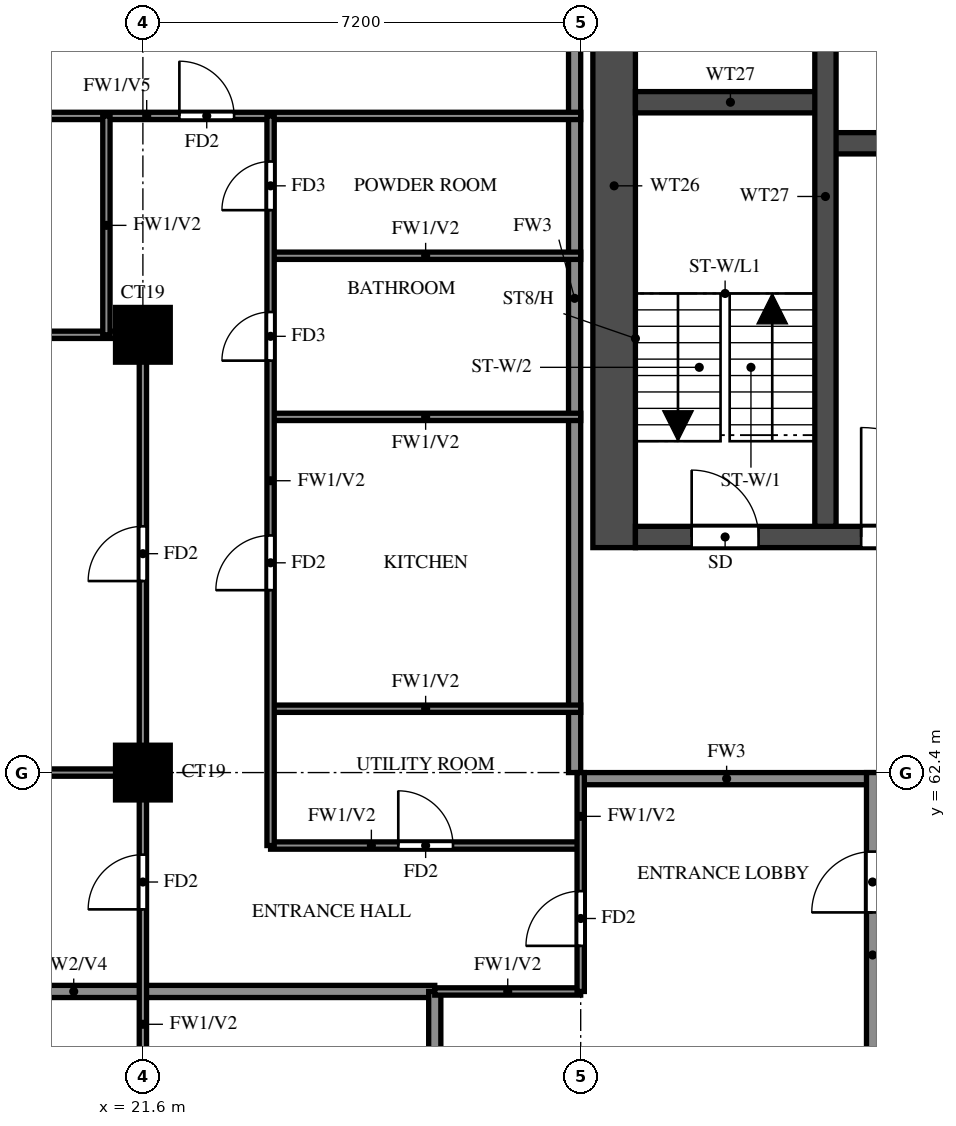
"""IFC4 building model, lengths in metres.
Left out: names, types, materials, properties, quantities, classifications, styles, units other than length and angle.
Written with IfcOpenShell. Run it as: python <this file> out.ifc"""

import sys

from ifc_helpers import new_model, si_unit, direction, frame, frame_2d, origin, origin_2d, place, context, subcontext, project, spatial, rectangle, extrude, source, transform, mapped, element, fill, save


model = new_model("IFC4")
c1 = context("Model", 3, precision=1e-05, world=origin(), true_north=direction((0.0, 1.0)))
c2 = subcontext(c1, "Body", "Model", "MODEL_VIEW")
j1 = project(units=[si_unit("LENGTHUNIT", "METRE"), si_unit("PLANEANGLEUNIT", "RADIAN")], contexts=[c1])
p1 = place(None, origin())
s1 = spatial("IfcSite", under=j1, at=p1, CompositionType="ELEMENT")
p2 = place(p1, origin())
s2 = spatial("IfcBuilding", under=s1, at=p2, CompositionType="ELEMENT")
p3 = place(p2, frame((0.0, 0.0, 181.5)))
s3 = spatial("IfcBuildingStorey", under=s2, at=p3, CompositionType="ELEMENT", Elevation=181.5)
m1 = source(origin(), c2, "Body", "SweptSolid", [
    extrude(rectangle(XDim=0.9, YDim=0.9, at=origin_2d()), origin(), (0.0, 0.0, 1.0), 3.2),
])
for number, where, z_axis, x_axis in (
    (1, (21.6, 62.4, 0.0), (0.0, 0.0, 1.0), (1.0, 0.0, 0.0)),
    (2, (21.6, 69.6, 0.0), (0.0, 0.0, 1.0), (1.0, 0.0, 0.0)),
):
    element("IfcColumn", number, at=place(p3, frame(where, z_axis=z_axis, x_axis=x_axis)), inside=s3, PredefinedType="COLUMN", context=c2, shape_type="MappedRepresentation", body=[
        mapped(m1, transform((0.0, 0.0, 0.0))),
    ])
p4 = place(p3, frame((29.35, 66.1, 0.0), z_axis=(0.0, 0.0, 1.0), x_axis=(0.0, 1.0, 0.0)))
e3 = element("IfcWall", 3, at=p4, inside=s3, PredefinedType="SHEAR", context=c2, shape_type="SweptSolid", body=[
    extrude(rectangle(XDim=11.9, YDim=0.7, at=frame_2d((5.95, 0.0))), origin(), (0.0, 0.0, 1.0), 3.2),
])
p5 = place(p3, frame((29.7, 66.275, 0.0), z_axis=(0.0, 0.0, 1.0), x_axis=(1.0, 0.0, 0.0)))
e4 = element("IfcWall", 4, at=p5, inside=s3, PredefinedType="SHEAR", context=c2, shape_type="SweptSolid", body=[
    extrude(rectangle(XDim=41.4, YDim=0.35, at=frame_2d((20.7, 0.0))), origin(), (0.0, 0.0, 1.0), 3.2),
])
p6 = place(p5, frame((0.925, 0.0, 0.0)))
e5 = element("IfcOpeningElement", 5, at=p6, cuts=e4, PredefinedType="OPENING", context=c2, shape_type="SweptSolid", body=[
    extrude(rectangle(XDim=1.1, YDim=2.1, at=frame_2d((0.55, 1.05))), frame((0.0, 0.185, 0.0), z_axis=(0.0, -1.0, 0.0), x_axis=(1.0, 0.0, 0.0)), (0.0, 0.0, 1.0), 0.37),
])
p7 = place(p5, frame((3.712, 0.0, 0.0)))
e6 = element("IfcOpeningElement", 6, at=p7, cuts=e4, PredefinedType="OPENING", context=c2, shape_type="SweptSolid", body=[
    extrude(rectangle(XDim=1.8, YDim=2.1, at=frame_2d((0.9, 1.05))), frame((0.0, 0.185, 0.0), z_axis=(0.0, -1.0, 0.0), x_axis=(1.0, 0.0, 0.0)), (0.0, 0.0, 1.0), 0.37),
])
p8 = place(p3, frame((32.825, 72.75, 0.0), z_axis=(0.0, 0.0, 1.0), x_axis=(1.0, 0.0, 0.0)))
e7 = element("IfcWall", 7, at=p8, inside=s3, PredefinedType="SHEAR", context=c2, shape_type="SweptSolid", body=[
    extrude(rectangle(XDim=35.15, YDim=0.35, at=frame_2d((17.575, 0.0))), origin(), (0.0, 0.0, 1.0), 3.2),
])
p9 = place(p8, frame((19.8, 0.0, 0.0)))
e8 = element("IfcOpeningElement", 8, at=p9, cuts=e7, PredefinedType="OPENING", context=c2, shape_type="SweptSolid", body=[
    extrude(rectangle(XDim=1.1, YDim=2.1, at=frame_2d((0.55, 1.05))), frame((0.0, 0.185, 0.0), z_axis=(0.0, -1.0, 0.0), x_axis=(1.0, 0.0, 0.0)), (0.0, 0.0, 1.0), 0.37),
])
p10 = place(p8, frame((27.7, 0.0, 0.0)))
e9 = element("IfcOpeningElement", 9, at=p10, cuts=e7, PredefinedType="OPENING", context=c2, shape_type="SweptSolid", body=[
    extrude(rectangle(XDim=1.1, YDim=2.1, at=frame_2d((0.55, 1.05))), frame((0.0, 0.185, 0.0), z_axis=(0.0, -1.0, 0.0), x_axis=(1.0, 0.0, 0.0)), (0.0, 0.0, 1.0), 0.37),
])
p11 = place(p8, frame((30.3, 0.0, 0.0)))
e10 = element("IfcOpeningElement", 10, at=p11, cuts=e7, PredefinedType="OPENING", context=c2, shape_type="SweptSolid", body=[
    extrude(rectangle(XDim=1.1, YDim=2.1, at=frame_2d((0.55, 1.05))), frame((0.0, 0.185, 0.0), z_axis=(0.0, -1.0, 0.0), x_axis=(1.0, 0.0, 0.0)), (0.0, 0.0, 1.0), 0.37),
])
p12 = place(p8, frame((3.8, 0.0, 0.0)))
e11 = element("IfcOpeningElement", 11, at=p12, cuts=e7, PredefinedType="OPENING", context=c2, shape_type="SweptSolid", body=[
    extrude(rectangle(XDim=1.1, YDim=2.1, at=frame_2d((0.55, 1.05))), frame((0.0, 0.185, 0.0), z_axis=(0.0, -1.0, 0.0), x_axis=(1.0, 0.0, 0.0)), (0.0, 0.0, 1.0), 0.37),
])
p13 = place(p8, frame((6.55, 0.0, 0.0)))
e12 = element("IfcOpeningElement", 12, at=p13, cuts=e7, PredefinedType="OPENING", context=c2, shape_type="SweptSolid", body=[
    extrude(rectangle(XDim=1.1, YDim=2.1, at=frame_2d((0.55, 1.05))), frame((0.0, 0.185, 0.0), z_axis=(0.0, -1.0, 0.0), x_axis=(1.0, 0.0, 0.0)), (0.0, 0.0, 1.0), 0.37),
])
p14 = place(p8, frame((9.3, 0.0, 0.0)))
e13 = element("IfcOpeningElement", 13, at=p14, cuts=e7, PredefinedType="OPENING", context=c2, shape_type="SweptSolid", body=[
    extrude(rectangle(XDim=1.1, YDim=2.1, at=frame_2d((0.55, 1.05))), frame((0.0, 0.185, 0.0), z_axis=(0.0, -1.0, 0.0), x_axis=(1.0, 0.0, 0.0)), (0.0, 0.0, 1.0), 0.37),
])
p15 = place(p8, frame((12.05, 0.0, 0.0)))
e14 = element("IfcOpeningElement", 14, at=p15, cuts=e7, PredefinedType="OPENING", context=c2, shape_type="SweptSolid", body=[
    extrude(rectangle(XDim=1.1, YDim=2.1, at=frame_2d((0.55, 1.05))), frame((0.0, 0.185, 0.0), z_axis=(0.0, -1.0, 0.0), x_axis=(1.0, 0.0, 0.0)), (0.0, 0.0, 1.0), 0.37),
])
p16 = place(p8, frame((14.8, 0.0, 0.0)))
e15 = element("IfcOpeningElement", 15, at=p16, cuts=e7, PredefinedType="OPENING", context=c2, shape_type="SweptSolid", body=[
    extrude(rectangle(XDim=1.1, YDim=2.1, at=frame_2d((0.55, 1.05))), frame((0.0, 0.185, 0.0), z_axis=(0.0, -1.0, 0.0), x_axis=(1.0, 0.0, 0.0)), (0.0, 0.0, 1.0), 0.37),
])
p17 = place(p8, frame((17.55, 0.0, 0.0)))
e16 = element("IfcOpeningElement", 16, at=p17, cuts=e7, PredefinedType="OPENING", context=c2, shape_type="SweptSolid", body=[
    extrude(rectangle(XDim=1.1, YDim=2.1, at=frame_2d((0.55, 1.05))), frame((0.0, 0.185, 0.0), z_axis=(0.0, -1.0, 0.0), x_axis=(1.0, 0.0, 0.0)), (0.0, 0.0, 1.0), 0.37),
])
p18 = place(p8, frame((0.938, 0.0, 0.0)))
e17 = element("IfcOpeningElement", 17, at=p18, cuts=e7, PredefinedType="OPENING", context=c2, shape_type="SweptSolid", body=[
    extrude(rectangle(XDim=1.1, YDim=2.1, at=frame_2d((0.55, 1.05))), frame((0.0, 0.185, 0.0), z_axis=(0.0, -1.0, 0.0), x_axis=(1.0, 0.0, 0.0)), (0.0, 0.0, 1.0), 0.37),
])
p19 = place(p3, frame((29.7, 73.425, 0.0), z_axis=(0.0, 0.0, 1.0), x_axis=(1.0, 0.0, 0.0)))
e18 = element("IfcWall", 18, at=p19, inside=s3, PredefinedType="SHEAR", context=c2, shape_type="SweptSolid", body=[
    extrude(rectangle(XDim=3.125, YDim=0.35, at=frame_2d((1.562, 0.0))), origin(), (0.0, 0.0, 1.0), 3.2),
])
p20 = place(p3, frame((32.825, 66.45, 0.0), z_axis=(0.0, 0.0, 1.0), x_axis=(0.0, 1.0, 0.0)))
e19 = element("IfcWall", 19, at=p20, inside=s3, PredefinedType="SHEAR", context=c2, shape_type="SweptSolid", body=[
    extrude(rectangle(XDim=10.85, YDim=0.35, at=frame_2d((5.425, 0.0))), origin(), (0.0, 0.0, 1.0), 3.2),
])
p21 = place(p3, frame((28.8, 62.3, 0.0), z_axis=(0.0, 0.0, 1.0), x_axis=(1.0, 0.0, 0.0)))
e20 = element("IfcWall", 20, at=p21, inside=s3, PredefinedType="SOLIDWALL", context=c2, shape_type="SweptSolid", body=[
    extrude(rectangle(XDim=4.8, YDim=0.2, at=frame_2d((2.4, 0.0))), origin(), (0.0, 0.0, 1.0), 3.2),
])
p22 = place(p3, frame((28.7, 62.4, 0.0), z_axis=(0.0, 0.0, 1.0), x_axis=(0.0, 1.0, 0.0)))
e21 = element("IfcWall", 21, at=p22, inside=s3, PredefinedType="SOLIDWALL", context=c2, shape_type="SweptSolid", body=[
    extrude(rectangle(XDim=15.6, YDim=0.2, at=frame_2d((7.8, 0.0))), origin(), (0.0, 0.0, 1.0), 3.2),
])
p23 = place(p3, frame((33.6, 56.4, 0.0), z_axis=(0.0, 0.0, 1.0), x_axis=(0.0, 1.0, 0.0)))
e22 = element("IfcWall", 22, at=p23, inside=s3, PredefinedType="SOLIDWALL", context=c2, shape_type="SweptSolid", body=[
    extrude(rectangle(XDim=6.0, YDim=0.2, at=frame_2d((3.0, 0.0))), origin(), (0.0, 0.0, 1.0), 3.2),
])
p24 = place(p23, frame((3.7, 0.0, 0.0)))
e23 = element("IfcOpeningElement", 23, at=p24, cuts=e22, PredefinedType="OPENING", context=c2, shape_type="SweptSolid", body=[
    extrude(rectangle(XDim=1.0, YDim=2.1, at=frame_2d((0.5, 1.05))), frame((0.0, 0.11, 0.0), z_axis=(0.0, -1.0, 0.0), x_axis=(1.0, 0.0, 0.0)), (0.0, 0.0, 1.0), 0.22),
])
p25 = place(p3, frame((14.525, 58.8, 0.0), z_axis=(0.0, 0.0, 1.0), x_axis=(1.0, 0.0, 0.0)))
e24 = element("IfcWall", 24, at=p25, inside=s3, PredefinedType="SOLIDWALL", context=c2, shape_type="SweptSolid", body=[
    extrude(rectangle(XDim=11.875, YDim=0.2, at=frame_2d((5.938, 0.0))), origin(), (0.0, 0.0, 1.0), 2.3),
])
p26 = place(p3, frame((26.4, 56.4, 0.0), z_axis=(0.0, 0.0, 1.0), x_axis=(0.0, 1.0, 0.0)))
e25 = element("IfcWall", 25, at=p26, inside=s3, PredefinedType="SOLIDWALL", context=c2, shape_type="SweptSolid", body=[
    extrude(rectangle(XDim=2.4, YDim=0.2, at=frame_2d((1.2, 0.0))), origin(), (0.0, 0.0, 1.0), 3.2),
])
p27 = place(p3, frame((26.4, 58.8, 0.0), z_axis=(0.0, 0.0, 1.0), x_axis=(1.0, 0.0, 0.0)))
e26 = element("IfcWall", 26, at=p27, inside=s3, PredefinedType="PARTITIONING", context=c2, shape_type="SweptSolid", body=[
    extrude(rectangle(XDim=2.4, YDim=0.12, at=frame_2d((1.2, 0.0))), origin(), (0.0, 0.0, 1.0), 3.2),
])
p28 = place(p3, frame((23.7, 61.2, 0.0), z_axis=(0.0, 0.0, 1.0), x_axis=(1.0, 0.0, 0.0)))
e27 = element("IfcWall", 27, at=p28, inside=s3, PredefinedType="PARTITIONING", context=c2, shape_type="SweptSolid", body=[
    extrude(rectangle(XDim=5.1, YDim=0.12, at=frame_2d((2.55, 0.0))), origin(), (0.0, 0.0, 1.0), 3.2),
])
p29 = place(p28, frame((2.1, 0.0, 0.0)))
e28 = element("IfcOpeningElement", 28, at=p29, cuts=e27, PredefinedType="OPENING", context=c2, shape_type="SweptSolid", body=[
    extrude(rectangle(XDim=0.9, YDim=2.1, at=frame_2d((0.45, 1.05))), frame((0.0, 0.07, 0.0), z_axis=(0.0, -1.0, 0.0), x_axis=(1.0, 0.0, 0.0)), (0.0, 0.0, 1.0), 0.14),
])
p30 = place(p3, frame((14.525, 62.4, 0.0), z_axis=(0.0, 0.0, 1.0), x_axis=(1.0, 0.0, 0.0)))
e29 = element("IfcWall", 29, at=p30, inside=s3, PredefinedType="PARTITIONING", context=c2, shape_type="SweptSolid", body=[
    extrude(rectangle(XDim=7.075, YDim=0.12, at=frame_2d((3.538, 0.0))), origin(), (0.0, 0.0, 1.0), 3.2),
])
for number, where, z_axis, x_axis in (
    (30, (23.7, 63.45, 0.0), (0.0, 0.0, 1.0), (1.0, 0.0, 0.0)),
    (31, (23.7, 68.25, 0.0), (0.0, 0.0, 1.0), (1.0, 0.0, 0.0)),
):
    element("IfcWall", number, at=place(p3, frame(where, z_axis=z_axis, x_axis=x_axis)), inside=s3, PredefinedType="PARTITIONING", context=c2, shape_type="SweptSolid", body=[
        extrude(rectangle(XDim=5.1, YDim=0.12, at=frame_2d((2.55, 0.0))), origin(), (0.0, 0.0, 1.0), 3.2),
    ])
p31 = place(p3, frame((14.525, 69.6, 0.0), z_axis=(0.0, 0.0, 1.0), x_axis=(1.0, 0.0, 0.0)))
e32 = element("IfcWall", 32, at=p31, inside=s3, PredefinedType="PARTITIONING", context=c2, shape_type="SweptSolid", body=[
    extrude(rectangle(XDim=7.075, YDim=0.12, at=frame_2d((3.538, 0.0))), origin(), (0.0, 0.0, 1.0), 3.2),
])
p32 = place(p31, frame((2.837, 0.0, 0.0)))
e33 = element("IfcOpeningElement", 33, at=p32, cuts=e32, PredefinedType="OPENING", context=c2, shape_type="SweptSolid", body=[
    extrude(rectangle(XDim=0.8, YDim=2.1, at=frame_2d((0.4, 1.05))), frame((0.0, 0.07, 0.0), z_axis=(0.0, -1.0, 0.0), x_axis=(1.0, 0.0, 0.0)), (0.0, 0.0, 1.0), 0.14),
])
p33 = place(p3, frame((23.7, 70.9, 0.0), z_axis=(0.0, 0.0, 1.0), x_axis=(1.0, 0.0, 0.0)))
e34 = element("IfcWall", 34, at=p33, inside=s3, PredefinedType="PARTITIONING", context=c2, shape_type="SweptSolid", body=[
    extrude(rectangle(XDim=5.1, YDim=0.12, at=frame_2d((2.55, 0.0))), origin(), (0.0, 0.0, 1.0), 3.2),
])
p34 = place(p3, frame((14.525, 73.2, 0.0), z_axis=(0.0, 0.0, 1.0), x_axis=(1.0, 0.0, 0.0)))
e35 = element("IfcWall", 35, at=p34, inside=s3, PredefinedType="PARTITIONING", context=c2, shape_type="SweptSolid", body=[
    extrude(rectangle(XDim=14.275, YDim=0.12, at=frame_2d((7.138, 0.0))), origin(), (0.0, 0.0, 1.0), 2.3),
])
p35 = place(p34, frame((7.675, 0.0, 0.0)))
e36 = element("IfcOpeningElement", 36, at=p35, cuts=e35, PredefinedType="OPENING", context=c2, shape_type="SweptSolid", body=[
    extrude(rectangle(XDim=0.9, YDim=2.1, at=frame_2d((0.45, 1.05))), frame((0.0, 0.07, 0.0), z_axis=(0.0, -1.0, 0.0), x_axis=(1.0, 0.0, 0.0)), (0.0, 0.0, 1.0), 0.14),
])
p36 = place(p3, frame((21.0, 69.6, 0.0), z_axis=(0.0, 0.0, 1.0), x_axis=(0.0, 1.0, 0.0)))
e37 = element("IfcWall", 37, at=p36, inside=s3, PredefinedType="PARTITIONING", context=c2, shape_type="SweptSolid", body=[
    extrude(rectangle(XDim=3.6, YDim=0.12, at=frame_2d((1.8, 0.0))), origin(), (0.0, 0.0, 1.0), 3.2),
])
p37 = place(p3, frame((21.6, 48.0, 0.0), z_axis=(0.0, 0.0, 1.0), x_axis=(0.0, 1.0, 0.0)))
e38 = element("IfcWall", 38, at=p37, inside=s3, PredefinedType="PARTITIONING", context=c2, shape_type="SweptSolid", body=[
    extrude(rectangle(XDim=21.6, YDim=0.12, at=frame_2d((10.8, 0.0))), origin(), (0.0, 0.0, 1.0), 3.2),
])
p38 = place(p37, frame((1.35, 0.0, 0.0)))
e39 = element("IfcOpeningElement", 39, at=p38, cuts=e38, PredefinedType="OPENING", context=c2, shape_type="SweptSolid", body=[
    extrude(rectangle(XDim=0.9, YDim=2.1, at=frame_2d((0.45, 1.05))), frame((0.0, 0.07, 0.0), z_axis=(0.0, -1.0, 0.0), x_axis=(1.0, 0.0, 0.0)), (0.0, 0.0, 1.0), 0.14),
])
p39 = place(p37, frame((7.95, 0.0, 0.0)))
e40 = element("IfcOpeningElement", 40, at=p39, cuts=e38, PredefinedType="OPENING", context=c2, shape_type="SweptSolid", body=[
    extrude(rectangle(XDim=1.5, YDim=2.1, at=frame_2d((0.75, 1.05))), frame((0.0, 0.07, 0.0), z_axis=(0.0, -1.0, 0.0), x_axis=(1.0, 0.0, 0.0)), (0.0, 0.0, 1.0), 0.14),
])
p40 = place(p37, frame((12.15, 0.0, 0.0)))
e41 = element("IfcOpeningElement", 41, at=p40, cuts=e38, PredefinedType="OPENING", context=c2, shape_type="SweptSolid", body=[
    extrude(rectangle(XDim=0.9, YDim=2.1, at=frame_2d((0.45, 1.05))), frame((0.0, 0.07, 0.0), z_axis=(0.0, -1.0, 0.0), x_axis=(1.0, 0.0, 0.0)), (0.0, 0.0, 1.0), 0.14),
])
p41 = place(p37, frame((17.55, 0.0, 0.0)))
e42 = element("IfcOpeningElement", 42, at=p41, cuts=e38, PredefinedType="OPENING", context=c2, shape_type="SweptSolid", body=[
    extrude(rectangle(XDim=0.9, YDim=2.1, at=frame_2d((0.45, 1.05))), frame((0.0, 0.07, 0.0), z_axis=(0.0, -1.0, 0.0), x_axis=(1.0, 0.0, 0.0)), (0.0, 0.0, 1.0), 0.14),
])
p42 = place(p3, frame((23.7, 61.2, 0.0), z_axis=(0.0, 0.0, 1.0), x_axis=(0.0, 1.0, 0.0)))
e43 = element("IfcWall", 43, at=p42, inside=s3, PredefinedType="PARTITIONING", context=c2, shape_type="SweptSolid", body=[
    extrude(rectangle(XDim=12.0, YDim=0.12, at=frame_2d((6.0, 0.0))), origin(), (0.0, 0.0, 1.0), 3.2),
])
p43 = place(p42, frame((4.2, 0.0, 0.0)))
e44 = element("IfcOpeningElement", 44, at=p43, cuts=e43, PredefinedType="OPENING", context=c2, shape_type="SweptSolid", body=[
    extrude(rectangle(XDim=0.9, YDim=2.1, at=frame_2d((0.45, 1.05))), frame((0.0, 0.07, 0.0), z_axis=(0.0, -1.0, 0.0), x_axis=(1.0, 0.0, 0.0)), (0.0, 0.0, 1.0), 0.14),
])
p44 = place(p42, frame((7.975, 0.0, 0.0)))
e45 = element("IfcOpeningElement", 45, at=p44, cuts=e43, PredefinedType="OPENING", context=c2, shape_type="SweptSolid", body=[
    extrude(rectangle(XDim=0.8, YDim=2.1, at=frame_2d((0.4, 1.05))), frame((0.0, 0.07, 0.0), z_axis=(0.0, -1.0, 0.0), x_axis=(1.0, 0.0, 0.0)), (0.0, 0.0, 1.0), 0.14),
])
p45 = place(p42, frame((10.45, 0.0, 0.0)))
e46 = element("IfcOpeningElement", 46, at=p45, cuts=e43, PredefinedType="OPENING", context=c2, shape_type="SweptSolid", body=[
    extrude(rectangle(XDim=0.8, YDim=2.1, at=frame_2d((0.4, 1.05))), frame((0.0, 0.07, 0.0), z_axis=(0.0, -1.0, 0.0), x_axis=(1.0, 0.0, 0.0)), (0.0, 0.0, 1.0), 0.14),
])
p46 = place(p3, frame((28.8, 58.8, 0.0), z_axis=(0.0, 0.0, 1.0), x_axis=(0.0, 1.0, 0.0)))
e47 = element("IfcWall", 47, at=p46, inside=s3, PredefinedType="PARTITIONING", context=c2, shape_type="SweptSolid", body=[
    extrude(rectangle(XDim=3.6, YDim=0.12, at=frame_2d((1.8, 0.0))), origin(), (0.0, 0.0, 1.0), 3.2),
])
p47 = place(p46, frame((0.75, 0.0, 0.0)))
e48 = element("IfcOpeningElement", 48, at=p47, cuts=e47, PredefinedType="OPENING", context=c2, shape_type="SweptSolid", body=[
    extrude(rectangle(XDim=0.9, YDim=2.1, at=frame_2d((0.45, 1.05))), frame((0.0, 0.07, 0.0), z_axis=(0.0, -1.0, 0.0), x_axis=(1.0, 0.0, 0.0)), (0.0, 0.0, 1.0), 0.14),
])
p48 = place(p6, origin())
e49 = element("IfcDoor", 49, at=p48, inside=s3, OperationType="SINGLE_SWING_LEFT", PredefinedType="DOOR", context=c2, shape_type="SweptSolid", body=[
    extrude(rectangle(XDim=1.1, YDim=2.1, at=frame_2d((0.55, 1.05))), frame((0.0, 0.025, 0.0), z_axis=(0.0, -1.0, 0.0), x_axis=(1.0, 0.0, 0.0)), (0.0, 0.0, 1.0), 0.05),
])
fill(e5, e49)
p49 = place(p7, origin())
e50 = element("IfcDoor", 50, at=p49, inside=s3, OperationType="DOUBLE_DOOR_SINGLE_SWING", PredefinedType="DOOR", context=c2, shape_type="SweptSolid", body=[
    extrude(rectangle(XDim=1.8, YDim=2.1, at=frame_2d((0.9, 1.05))), frame((0.0, 0.025, 0.0), z_axis=(0.0, -1.0, 0.0), x_axis=(1.0, 0.0, 0.0)), (0.0, 0.0, 1.0), 0.05),
])
fill(e6, e50)
p50 = place(p47, origin())
e51 = element("IfcDoor", 51, at=p50, inside=s3, OperationType="SINGLE_SWING_LEFT", PredefinedType="DOOR", context=c2, shape_type="SweptSolid", body=[
    extrude(rectangle(XDim=0.9, YDim=2.1, at=frame_2d((0.45, 1.05))), frame((0.0, 0.025, 0.0), z_axis=(0.0, -1.0, 0.0), x_axis=(1.0, 0.0, 0.0)), (0.0, 0.0, 1.0), 0.05),
])
fill(e48, e51)
p51 = place(p24, origin())
e52 = element("IfcDoor", 52, at=p51, inside=s3, OperationType="SINGLE_SWING_LEFT", PredefinedType="DOOR", context=c2, shape_type="SweptSolid", body=[
    extrude(rectangle(XDim=1.0, YDim=2.1, at=frame_2d((0.5, 1.05))), frame((0.0, 0.025, 0.0), z_axis=(0.0, -1.0, 0.0), x_axis=(1.0, 0.0, 0.0)), (0.0, 0.0, 1.0), 0.05),
])
fill(e23, e52)
p52 = place(p40, origin())
e53 = element("IfcDoor", 53, at=p52, inside=s3, OperationType="SINGLE_SWING_RIGHT", PredefinedType="DOOR", context=c2, shape_type="SweptSolid", body=[
    extrude(rectangle(XDim=0.9, YDim=2.1, at=frame_2d((0.45, 1.05))), frame((0.0, 0.025, 0.0), z_axis=(0.0, -1.0, 0.0), x_axis=(1.0, 0.0, 0.0)), (0.0, 0.0, 1.0), 0.05),
])
fill(e41, e53)
p53 = place(p41, origin())
e54 = element("IfcDoor", 54, at=p53, inside=s3, OperationType="SINGLE_SWING_LEFT", PredefinedType="DOOR", context=c2, shape_type="SweptSolid", body=[
    extrude(rectangle(XDim=0.9, YDim=2.1, at=frame_2d((0.45, 1.05))), frame((0.0, 0.025, 0.0), z_axis=(0.0, -1.0, 0.0), x_axis=(1.0, 0.0, 0.0)), (0.0, 0.0, 1.0), 0.05),
])
fill(e42, e54)
p54 = place(p35, origin())
e55 = element("IfcDoor", 55, at=p54, inside=s3, OperationType="SINGLE_SWING_RIGHT", PredefinedType="DOOR", context=c2, shape_type="SweptSolid", body=[
    extrude(rectangle(XDim=0.9, YDim=2.1, at=frame_2d((0.45, 1.05))), frame((0.0, 0.025, 0.0), z_axis=(0.0, -1.0, 0.0), x_axis=(1.0, 0.0, 0.0)), (0.0, 0.0, 1.0), 0.05),
])
fill(e36, e55)
p55 = place(p29, origin())
e56 = element("IfcDoor", 56, at=p55, inside=s3, OperationType="SINGLE_SWING_LEFT", PredefinedType="DOOR", context=c2, shape_type="SweptSolid", body=[
    extrude(rectangle(XDim=0.9, YDim=2.1, at=frame_2d((0.45, 1.05))), frame((0.0, 0.025, 0.0), z_axis=(0.0, -1.0, 0.0), x_axis=(1.0, 0.0, 0.0)), (0.0, 0.0, 1.0), 0.05),
])
fill(e28, e56)
p56 = place(p43, origin())
e57 = element("IfcDoor", 57, at=p56, inside=s3, OperationType="SINGLE_SWING_LEFT", PredefinedType="DOOR", context=c2, shape_type="SweptSolid", body=[
    extrude(rectangle(XDim=0.9, YDim=2.1, at=frame_2d((0.45, 1.05))), frame((0.0, 0.025, 0.0), z_axis=(0.0, -1.0, 0.0), x_axis=(1.0, 0.0, 0.0)), (0.0, 0.0, 1.0), 0.05),
])
fill(e44, e57)
p57 = place(p44, origin())
e58 = element("IfcDoor", 58, at=p57, inside=s3, OperationType="SINGLE_SWING_RIGHT", PredefinedType="DOOR", context=c2, shape_type="SweptSolid", body=[
    extrude(rectangle(XDim=0.8, YDim=2.1, at=frame_2d((0.4, 1.05))), frame((0.0, 0.025, 0.0), z_axis=(0.0, -1.0, 0.0), x_axis=(1.0, 0.0, 0.0)), (0.0, 0.0, 1.0), 0.05),
])
fill(e45, e58)
p58 = place(p45, origin())
e59 = element("IfcDoor", 59, at=p58, inside=s3, OperationType="SINGLE_SWING_LEFT", PredefinedType="DOOR", context=c2, shape_type="SweptSolid", body=[
    extrude(rectangle(XDim=0.8, YDim=2.1, at=frame_2d((0.4, 1.05))), frame((0.0, 0.025, 0.0), z_axis=(0.0, -1.0, 0.0), x_axis=(1.0, 0.0, 0.0)), (0.0, 0.0, 1.0), 0.05),
])
fill(e46, e59)
save(model, sys.argv[1])
